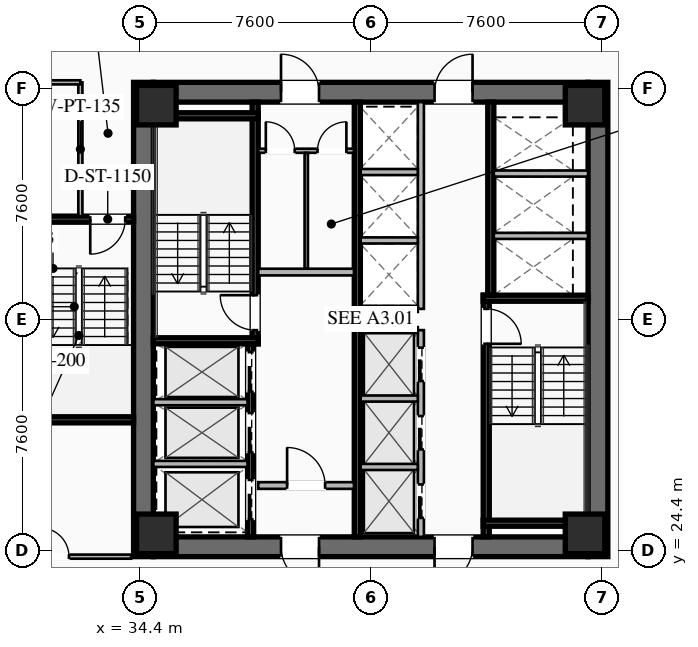
"""IFC4 building model, lengths in metres.
Left out: names, types, materials, properties, quantities, classifications, styles, units other than length and angle.
Written with IfcOpenShell. Run it as: python <this file> out.ifc"""

import sys

from ifc_helpers import new_model, si_unit, direction, frame, frame_2d, origin, origin_2d, place, context, subcontext, project, spatial, rectangle, hollow_rectangle, extrude, element, fill, save


model = new_model("IFC4")
c1 = context("Model", 3, precision=1e-05, world=origin(), true_north=direction((0.0, 1.0)))
c2 = subcontext(c1, "Body", "Model", "MODEL_VIEW")
j1 = project(units=[si_unit("LENGTHUNIT", "METRE"), si_unit("PLANEANGLEUNIT", "RADIAN")], contexts=[c1])
p1 = place(None, origin())
s1 = spatial("IfcSite", under=j1, at=p1, CompositionType="ELEMENT")
p2 = place(p1, origin())
s2 = spatial("IfcBuilding", under=s1, at=p2, CompositionType="ELEMENT")
p3 = place(p2, frame((0.0, 0.0, 81.4)))
s3 = spatial("IfcBuildingStorey", under=s2, at=p3, CompositionType="ELEMENT", Elevation=81.4)
for number, where, z_axis, x_axis in (
    (1, (34.525, 24.2, 0.0), (0.0, 0.0, 1.0), (0.0, 1.0, 0.0)),
    (2, (49.475, 39.8, 0.0), (0.0, 0.0, 1.0), (0.0, -1.0, 0.0)),
):
    element("IfcWall", number, at=place(p3, frame(where, z_axis=z_axis, x_axis=x_axis)), inside=s3, PredefinedType="SHEAR", context=c2, shape_type="SweptSolid", body=[
        extrude(rectangle(XDim=15.6, YDim=0.65, at=frame_2d((7.8, 0.0))), origin(), (0.0, 0.0, 1.0), 3.55),
    ])
p4 = place(p3, frame((49.15, 24.525, 0.0), z_axis=(0.0, 0.0, 1.0), x_axis=(-1.0, 0.0, 0.0)))
e3 = element("IfcWall", 3, at=p4, inside=s3, PredefinedType="SHEAR", context=c2, shape_type="SweptSolid", body=[
    extrude(rectangle(XDim=14.3, YDim=0.65, at=frame_2d((7.15, 0.0))), origin(), (0.0, 0.0, 1.0), 3.55),
])
p5 = place(p4, frame((8.85, 0.0, 0.0)))
e4 = element("IfcOpeningElement", 4, at=p5, cuts=e3, PredefinedType="OPENING", context=c2, shape_type="SweptSolid", body=[
    extrude(rectangle(XDim=1.25, YDim=2.25, at=frame_2d((0.625, 1.125))), frame((0.0, 0.335, 0.0), z_axis=(0.0, -1.0, 0.0), x_axis=(1.0, 0.0, 0.0)), (0.0, 0.0, 1.0), 0.67),
])
p6 = place(p4, frame((3.8, 0.0, 0.0)))
e5 = element("IfcOpeningElement", 5, at=p6, cuts=e3, PredefinedType="OPENING", context=c2, shape_type="SweptSolid", body=[
    extrude(rectangle(XDim=1.25, YDim=2.25, at=frame_2d((0.625, 1.125))), frame((0.0, 0.335, 0.0), z_axis=(0.0, -1.0, 0.0), x_axis=(1.0, 0.0, 0.0)), (0.0, 0.0, 1.0), 0.67),
])
p7 = place(p3, frame((34.85, 39.475, 0.0), z_axis=(0.0, 0.0, 1.0), x_axis=(1.0, 0.0, 0.0)))
e6 = element("IfcWall", 6, at=p7, inside=s3, PredefinedType="SHEAR", context=c2, shape_type="SweptSolid", body=[
    extrude(rectangle(XDim=14.3, YDim=0.65, at=frame_2d((7.15, 0.0))), origin(), (0.0, 0.0, 1.0), 3.55),
])
p8 = place(p7, frame((4.2, 0.0, 0.0)))
e7 = element("IfcOpeningElement", 7, at=p8, cuts=e6, PredefinedType="OPENING", context=c2, shape_type="SweptSolid", body=[
    extrude(rectangle(XDim=1.25, YDim=2.25, at=frame_2d((0.625, 1.125))), frame((0.0, 0.335, 0.0), z_axis=(0.0, -1.0, 0.0), x_axis=(1.0, 0.0, 0.0)), (0.0, 0.0, 1.0), 0.67),
])
p9 = place(p7, frame((9.25, 0.0, 0.0)))
e8 = element("IfcOpeningElement", 8, at=p9, cuts=e6, PredefinedType="OPENING", context=c2, shape_type="SweptSolid", body=[
    extrude(rectangle(XDim=1.25, YDim=2.25, at=frame_2d((0.625, 1.125))), frame((0.0, 0.335, 0.0), z_axis=(0.0, -1.0, 0.0), x_axis=(1.0, 0.0, 0.0)), (0.0, 0.0, 1.0), 0.67),
])
for number, where, z_axis, x_axis in (
    (9, (34.95, 24.95, 0.0), (0.0, 0.0, 1.0), (1.0, 0.0, 0.0)),
    (10, (49.05, 24.95, 0.0), (0.0, 0.0, 1.0), (1.0, 0.0, 0.0)),
    (11, (49.05, 39.05, 0.0), (0.0, 0.0, 1.0), (1.0, 0.0, 0.0)),
    (12, (34.95, 39.05, 0.0), (0.0, 0.0, 1.0), (1.0, 0.0, 0.0)),
):
    element("IfcColumn", number, at=place(p3, frame(where, z_axis=z_axis, x_axis=x_axis)), inside=s3, PredefinedType="COLUMN", context=c2, shape_type="SweptSolid", body=[
        extrude(hollow_rectangle(XDim=1.3, YDim=1.3, WallThickness=0.05, at=origin_2d()), origin(), (0.0, 0.0, 1.0), 3.35),
    ])
p10 = place(p3, frame((38.2, 31.2, 0.0), z_axis=(0.0, 0.0, 1.0), x_axis=(0.0, 1.0, 0.0)))
e13 = element("IfcWall", 13, at=p10, inside=s3, PredefinedType="SHEAR", context=c2, shape_type="SweptSolid", body=[
    extrude(rectangle(XDim=7.95, YDim=0.2, at=frame_2d((3.975, 0.0))), origin(), (0.0, 0.0, 1.0), 3.35),
])
p11 = place(p10, frame((0.45, 0.0, 0.0)))
e14 = element("IfcOpeningElement", 14, at=p11, cuts=e13, PredefinedType="OPENING", context=c2, shape_type="SweptSolid", body=[
    extrude(rectangle(XDim=1.15, YDim=2.2, at=frame_2d((0.575, 1.1))), frame((0.0, 0.11, 0.0), z_axis=(0.0, -1.0, 0.0), x_axis=(1.0, 0.0, 0.0)), (0.0, 0.0, 1.0), 0.22),
])
for number, where, z_axis, x_axis in (
    (15, (34.85, 31.3, 0.0), (0.0, 0.0, 1.0), (1.0, 0.0, 0.0)),
    (16, (34.85, 38.7, 0.0), (0.0, 0.0, 1.0), (1.0, 0.0, 0.0)),
):
    element("IfcWall", number, at=place(p3, frame(where, z_axis=z_axis, x_axis=x_axis)), inside=s3, PredefinedType="SHEAR", context=c2, shape_type="SweptSolid", body=[
        extrude(rectangle(XDim=3.45, YDim=0.2, at=frame_2d((1.725, 0.0))), origin(), (0.0, 0.0, 1.0), 3.35),
    ])
p12 = place(p3, frame((45.8, 32.8, 0.0), z_axis=(0.0, 0.0, 1.0), x_axis=(0.0, -1.0, 0.0)))
e17 = element("IfcWall", 17, at=p12, inside=s3, PredefinedType="SHEAR", context=c2, shape_type="SweptSolid", body=[
    extrude(rectangle(XDim=7.95, YDim=0.2, at=frame_2d((3.975, 0.0))), origin(), (0.0, 0.0, 1.0), 3.35),
])
p13 = place(p12, frame((0.45, 0.0, 0.0)))
e18 = element("IfcOpeningElement", 18, at=p13, cuts=e17, PredefinedType="OPENING", context=c2, shape_type="SweptSolid", body=[
    extrude(rectangle(XDim=1.15, YDim=2.2, at=frame_2d((0.575, 1.1))), frame((0.0, 0.11, 0.0), z_axis=(0.0, -1.0, 0.0), x_axis=(1.0, 0.0, 0.0)), (0.0, 0.0, 1.0), 0.22),
])
for number, where, z_axis, x_axis in (
    (19, (45.7, 32.7, 0.0), (0.0, 0.0, 1.0), (1.0, 0.0, 0.0)),
    (20, (45.7, 25.3, 0.0), (0.0, 0.0, 1.0), (1.0, 0.0, 0.0)),
):
    element("IfcWall", number, at=place(p3, frame(where, z_axis=z_axis, x_axis=x_axis)), inside=s3, PredefinedType="SHEAR", context=c2, shape_type="SweptSolid", body=[
        extrude(rectangle(XDim=3.45, YDim=0.2, at=frame_2d((1.725, 0.0))), origin(), (0.0, 0.0, 1.0), 3.35),
    ])
p14 = place(p3, frame((41.56, 24.85, 0.0), z_axis=(0.0, 0.0, 1.0), x_axis=(0.0, 1.0, 0.0)))
e21 = element("IfcWall", 21, at=p14, inside=s3, PredefinedType="SHEAR", context=c2, shape_type="SweptSolid", body=[
    extrude(rectangle(XDim=14.3, YDim=0.2, at=frame_2d((7.15, 0.0))), origin(), (0.0, 0.0, 1.0), 3.35),
])
p15 = place(p3, frame((38.3, 33.56, 0.0), z_axis=(0.0, 0.0, 1.0), x_axis=(1.0, 0.0, 0.0)))
e22 = element("IfcWall", 22, at=p15, inside=s3, PredefinedType="SOLIDWALL", context=c2, shape_type="SweptSolid", body=[
    extrude(rectangle(XDim=3.15, YDim=0.22, at=frame_2d((1.575, 0.0))), origin(), (0.0, 0.0, 1.0), 2.703),
])
p16 = place(p3, frame((38.3, 26.54, 0.0), z_axis=(0.0, 0.0, 1.0), x_axis=(1.0, 0.0, 0.0)))
e23 = element("IfcWall", 23, at=p16, inside=s3, PredefinedType="SOLIDWALL", context=c2, shape_type="SweptSolid", body=[
    extrude(rectangle(XDim=3.15, YDim=0.22, at=frame_2d((1.575, 0.0))), origin(), (0.0, 0.0, 1.0), 2.703),
])
p17 = place(p16, frame((0.95, 0.0, 0.0)))
e24 = element("IfcOpeningElement", 24, at=p17, cuts=e23, PredefinedType="OPENING", context=c2, shape_type="SweptSolid", body=[
    extrude(rectangle(XDim=1.25, YDim=2.25, at=frame_2d((0.625, 1.125))), frame((0.0, 0.12, 0.0), z_axis=(0.0, -1.0, 0.0), x_axis=(1.0, 0.0, 0.0)), (0.0, 0.0, 1.0), 0.24),
])
p18 = place(p3, frame((38.05, 24.85, 0.0), z_axis=(0.0, 0.0, 1.0), x_axis=(0.0, 1.0, 0.0)))
e25 = element("IfcWall", 25, at=p18, inside=s3, PredefinedType="SHEAR", context=c2, shape_type="SweptSolid", body=[
    extrude(rectangle(XDim=6.35, YDim=0.2, at=frame_2d((3.175, 0.0))), origin(), (0.0, 0.0, 1.0), 3.35),
])
p19 = place(p18, frame((4.775, 0.0, 0.0)))
e26 = element("IfcOpeningElement", 26, at=p19, cuts=e25, PredefinedType="OPENING", context=c2, shape_type="SweptSolid", body=[
    extrude(rectangle(XDim=1.3, YDim=2.25, at=frame_2d((0.65, 1.125))), frame((0.0, 0.11, 0.0), z_axis=(0.0, -1.0, 0.0), x_axis=(1.0, 0.0, 0.0)), (0.0, 0.0, 1.0), 0.22),
])
p20 = place(p18, frame((2.775, 0.0, 0.0)))
e27 = element("IfcOpeningElement", 27, at=p20, cuts=e25, PredefinedType="OPENING", context=c2, shape_type="SweptSolid", body=[
    extrude(rectangle(XDim=1.3, YDim=2.25, at=frame_2d((0.65, 1.125))), frame((0.0, 0.11, 0.0), z_axis=(0.0, -1.0, 0.0), x_axis=(1.0, 0.0, 0.0)), (0.0, 0.0, 1.0), 0.22),
])
p21 = place(p18, frame((0.575, 0.0, 0.0)))
e28 = element("IfcOpeningElement", 28, at=p21, cuts=e25, PredefinedType="OPENING", context=c2, shape_type="SweptSolid", body=[
    extrude(rectangle(XDim=1.3, YDim=2.25, at=frame_2d((0.65, 1.125))), frame((0.0, 0.11, 0.0), z_axis=(0.0, -1.0, 0.0), x_axis=(1.0, 0.0, 0.0)), (0.0, 0.0, 1.0), 0.22),
])
for number, where, z_axis, x_axis in (
    (29, (34.85, 27.25, 0.0), (0.0, 0.0, 1.0), (1.0, 0.0, 0.0)),
    (30, (34.85, 29.28, 0.0), (0.0, 0.0, 1.0), (1.0, 0.0, 0.0)),
):
    element("IfcWall", number, at=place(p3, frame(where, z_axis=z_axis, x_axis=x_axis)), inside=s3, PredefinedType="SOLIDWALL", context=c2, shape_type="SweptSolid", body=[
        extrude(rectangle(XDim=3.1, YDim=0.2, at=frame_2d((1.55, 0.0))), origin(), (0.0, 0.0, 1.0), 3.35),
    ])
p22 = place(p3, frame((45.95, 39.15, 0.0), z_axis=(0.0, 0.0, 1.0), x_axis=(0.0, -1.0, 0.0)))
e31 = element("IfcWall", 31, at=p22, inside=s3, PredefinedType="SHEAR", context=c2, shape_type="SweptSolid", body=[
    extrude(rectangle(XDim=6.35, YDim=0.2, at=frame_2d((3.175, 0.0))), origin(), (0.0, 0.0, 1.0), 3.35),
])
for number, where, z_axis, x_axis in (
    (32, (46.05, 34.75, 0.0), (0.0, 0.0, 1.0), (1.0, 0.0, 0.0)),
    (33, (46.05, 36.8, 0.0), (0.0, 0.0, 1.0), (1.0, 0.0, 0.0)),
):
    element("IfcWall", number, at=place(p3, frame(where, z_axis=z_axis, x_axis=x_axis)), inside=s3, PredefinedType="SOLIDWALL", context=c2, shape_type="SweptSolid", body=[
        extrude(rectangle(XDim=3.1, YDim=0.2, at=frame_2d((1.55, 0.0))), origin(), (0.0, 0.0, 1.0), 3.35),
    ])
p23 = place(p3, frame((38.3, 37.55, 0.0), z_axis=(0.0, 0.0, 1.0), x_axis=(1.0, 0.0, 0.0)))
e34 = element("IfcWall", 34, at=p23, inside=s3, PredefinedType="PARTITIONING", context=c2, shape_type="SweptSolid", body=[
    extrude(rectangle(XDim=3.15, YDim=0.135, at=frame_2d((1.575, 0.0))), origin(), (0.0, 0.0, 1.0), 2.703),
])
p24 = place(p23, frame((0.25, 0.0, 0.0)))
e35 = element("IfcOpeningElement", 35, at=p24, cuts=e34, PredefinedType="OPENING", context=c2, shape_type="SweptSolid", body=[
    extrude(rectangle(XDim=0.95, YDim=2.05, at=frame_2d((0.475, 1.025))), frame((0.0, 0.077, 0.0), z_axis=(0.0, -1.0, 0.0), x_axis=(1.0, 0.0, 0.0)), (0.0, 0.0, 1.0), 0.155),
])
p25 = place(p23, frame((1.95, 0.0, 0.0)))
e36 = element("IfcOpeningElement", 36, at=p25, cuts=e34, PredefinedType="OPENING", context=c2, shape_type="SweptSolid", body=[
    extrude(rectangle(XDim=0.95, YDim=2.05, at=frame_2d((0.475, 1.025))), frame((0.0, 0.077, 0.0), z_axis=(0.0, -1.0, 0.0), x_axis=(1.0, 0.0, 0.0)), (0.0, 0.0, 1.0), 0.155),
])
p26 = place(p3, frame((39.88, 33.68, 0.0), z_axis=(0.0, 0.0, 1.0), x_axis=(0.0, 1.0, 0.0)))
e37 = element("IfcWall", 37, at=p26, inside=s3, PredefinedType="PARTITIONING", context=c2, shape_type="SweptSolid", body=[
    extrude(rectangle(XDim=3.8, YDim=0.11, at=frame_2d((1.9, 0.0))), origin(), (0.0, 0.0, 1.0), 2.703),
])
p27 = place(p3, frame((43.65, 24.85, 0.0), z_axis=(0.0, 0.0, 1.0), x_axis=(0.0, 1.0, 0.0)))
e38 = element("IfcWall", 38, at=p27, inside=s3, PredefinedType="SOLIDWALL", context=c2, shape_type="SweptSolid", body=[
    extrude(rectangle(XDim=6.8, YDim=0.2, at=frame_2d((3.4, 0.0))), origin(), (0.0, 0.0, 1.0), 3.35),
])
p28 = place(p27, frame((0.625, 0.0, 0.0)))
e39 = element("IfcOpeningElement", 39, at=p28, cuts=e38, PredefinedType="OPENING", context=c2, shape_type="SweptSolid", body=[
    extrude(rectangle(XDim=1.1, YDim=2.2, at=frame_2d((0.55, 1.1))), frame((0.0, 0.11, 0.0), z_axis=(0.0, -1.0, 0.0), x_axis=(1.0, 0.0, 0.0)), (0.0, 0.0, 1.0), 0.22),
])
p29 = place(p27, frame((2.875, 0.0, 0.0)))
e40 = element("IfcOpeningElement", 40, at=p29, cuts=e38, PredefinedType="OPENING", context=c2, shape_type="SweptSolid", body=[
    extrude(rectangle(XDim=1.1, YDim=2.2, at=frame_2d((0.55, 1.1))), frame((0.0, 0.11, 0.0), z_axis=(0.0, -1.0, 0.0), x_axis=(1.0, 0.0, 0.0)), (0.0, 0.0, 1.0), 0.22),
])
p30 = place(p27, frame((5.125, 0.0, 0.0)))
e41 = element("IfcOpeningElement", 41, at=p30, cuts=e38, PredefinedType="OPENING", context=c2, shape_type="SweptSolid", body=[
    extrude(rectangle(XDim=1.1, YDim=2.2, at=frame_2d((0.55, 1.1))), frame((0.0, 0.11, 0.0), z_axis=(0.0, -1.0, 0.0), x_axis=(1.0, 0.0, 0.0)), (0.0, 0.0, 1.0), 0.22),
])
for number, where, z_axis, x_axis in (
    (42, (41.67, 27.15, 0.0), (0.0, 0.0, 1.0), (1.0, 0.0, 0.0)),
    (43, (41.67, 29.4, 0.0), (0.0, 0.0, 1.0), (1.0, 0.0, 0.0)),
    (44, (41.67, 31.65, 0.0), (0.0, 0.0, 1.0), (1.0, 0.0, 0.0)),
):
    element("IfcWall", number, at=place(p3, frame(where, z_axis=z_axis, x_axis=x_axis)), inside=s3, PredefinedType="SOLIDWALL", context=c2, shape_type="SweptSolid", body=[
        extrude(rectangle(XDim=1.88, YDim=0.2, at=frame_2d((0.94, 0.0))), origin(), (0.0, 0.0, 1.0), 3.35),
    ])
p31 = place(p3, frame((43.65, 32.35, 0.0), z_axis=(0.0, 0.0, 1.0), x_axis=(0.0, 1.0, 0.0)))
e45 = element("IfcWall", 45, at=p31, inside=s3, PredefinedType="SOLIDWALL", context=c2, shape_type="SweptSolid", body=[
    extrude(rectangle(XDim=6.8, YDim=0.2, at=frame_2d((3.4, 0.0))), origin(), (0.0, 0.0, 1.0), 3.35),
])
for number, where, z_axis, x_axis in (
    (46, (41.67, 32.35, 0.0), (0.0, 0.0, 1.0), (1.0, 0.0, 0.0)),
    (47, (41.67, 34.6, 0.0), (0.0, 0.0, 1.0), (1.0, 0.0, 0.0)),
    (48, (41.67, 36.85, 0.0), (0.0, 0.0, 1.0), (1.0, 0.0, 0.0)),
):
    element("IfcWall", number, at=place(p3, frame(where, z_axis=z_axis, x_axis=x_axis)), inside=s3, PredefinedType="SOLIDWALL", context=c2, shape_type="SweptSolid", body=[
        extrude(rectangle(XDim=1.88, YDim=0.2, at=frame_2d((0.94, 0.0))), origin(), (0.0, 0.0, 1.0), 3.35),
    ])
p32 = place(p3, frame((34.2, 35.3, 0.0), z_axis=(0.0, 0.0, 1.0), x_axis=(-1.0, 0.0, 0.0)))
e49 = element("IfcWall", 49, at=p32, inside=s3, PredefinedType="SHEAR", context=c2, shape_type="SweptSolid", body=[
    extrude(rectangle(XDim=3.4, YDim=0.2, at=frame_2d((1.7, 0.0))), origin(), (0.0, 0.0, 1.0), 3.35),
])
p33 = place(p32, frame((0.275, 0.0, 0.0)))
e50 = element("IfcOpeningElement", 50, at=p33, cuts=e49, PredefinedType="OPENING", context=c2, shape_type="SweptSolid", body=[
    extrude(rectangle(XDim=1.15, YDim=2.2, at=frame_2d((0.575, 1.1))), frame((0.0, 0.11, 0.0), z_axis=(0.0, -1.0, 0.0), x_axis=(1.0, 0.0, 0.0)), (0.0, 0.0, 1.0), 0.22),
])
p34 = place(p3, frame((30.8, 28.7, 0.0), z_axis=(0.0, 0.0, 1.0), x_axis=(1.0, 0.0, 0.0)))
e51 = element("IfcWall", 51, at=p34, inside=s3, PredefinedType="SHEAR", context=c2, shape_type="SweptSolid", body=[
    extrude(rectangle(XDim=3.4, YDim=0.2, at=frame_2d((1.7, 0.0))), origin(), (0.0, 0.0, 1.0), 3.35),
])
p35 = place(p3, frame((32.45, 35.4, 0.0), z_axis=(0.0, 0.0, 1.0), x_axis=(0.0, 1.0, 0.0)))
e52 = element("IfcWall", 52, at=p35, inside=s3, PredefinedType="PARTITIONING", context=c2, shape_type="SweptSolid", body=[
    extrude(rectangle(XDim=4.4, YDim=0.135, at=frame_2d((2.2, 0.0))), origin(), (0.0, 0.0, 1.0), 2.703),
])
p36 = place(p3, frame((32.45, 39.8, 0.0), z_axis=(0.0, 0.0, 1.0), x_axis=(-1.0, 0.0, 0.0)))
e53 = element("IfcWall", 53, at=p36, inside=s3, PredefinedType="PARTITIONING", context=c2, shape_type="SweptSolid", body=[
    extrude(rectangle(XDim=11.43, YDim=0.135, at=frame_2d((5.715, 0.0))), origin(), (0.0, 0.0, 1.0), 2.703),
])
p37 = place(p36, frame((4.89, 0.0, 0.0)))
e54 = element("IfcOpeningElement", 54, at=p37, cuts=e53, PredefinedType="OPENING", context=c2, shape_type="SweptSolid", body=[
    extrude(rectangle(XDim=0.95, YDim=2.05, at=frame_2d((0.475, 1.025))), frame((0.0, 0.077, 0.0), z_axis=(0.0, -1.0, 0.0), x_axis=(1.0, 0.0, 0.0)), (0.0, 0.0, 1.0), 0.155),
])
p38 = place(p3, frame((21.02, 24.2, 0.0), z_axis=(0.0, 0.0, 1.0), x_axis=(1.0, 0.0, 0.0)))
e55 = element("IfcWall", 55, at=p38, inside=s3, PredefinedType="PARTITIONING", context=c2, shape_type="SweptSolid", body=[
    extrude(rectangle(XDim=13.1, YDim=0.135, at=frame_2d((6.55, 0.0))), origin(), (0.0, 0.0, 1.0), 2.703),
])
p39 = place(p38, frame((10.105, 0.0, 0.0)))
e56 = element("IfcOpeningElement", 56, at=p39, cuts=e55, PredefinedType="OPENING", context=c2, shape_type="SweptSolid", body=[
    extrude(rectangle(XDim=0.95, YDim=2.05, at=frame_2d((0.475, 1.025))), frame((0.0, 0.077, 0.0), z_axis=(0.0, -1.0, 0.0), x_axis=(1.0, 0.0, 0.0)), (0.0, 0.0, 1.0), 0.155),
])
p40 = place(p8, origin())
e57 = element("IfcDoor", 57, at=p40, inside=s3, OperationType="SINGLE_SWING_LEFT", PredefinedType="DOOR", context=c2, shape_type="SweptSolid", body=[
    extrude(rectangle(XDim=1.25, YDim=2.25, at=frame_2d((0.625, 1.125))), frame((0.0, 0.025, 0.0), z_axis=(0.0, -1.0, 0.0), x_axis=(1.0, 0.0, 0.0)), (0.0, 0.0, 1.0), 0.05),
])
fill(e7, e57)
p41 = place(p9, origin())
e58 = element("IfcDoor", 58, at=p41, inside=s3, OperationType="SINGLE_SWING_RIGHT", PredefinedType="DOOR", context=c2, shape_type="SweptSolid", body=[
    extrude(rectangle(XDim=1.25, YDim=2.25, at=frame_2d((0.625, 1.125))), frame((0.0, 0.025, 0.0), z_axis=(0.0, -1.0, 0.0), x_axis=(1.0, 0.0, 0.0)), (0.0, 0.0, 1.0), 0.05),
])
fill(e8, e58)
p42 = place(p5, origin())
e59 = element("IfcDoor", 59, at=p42, inside=s3, OperationType="SINGLE_SWING_LEFT", PredefinedType="DOOR", context=c2, shape_type="SweptSolid", body=[
    extrude(rectangle(XDim=1.25, YDim=2.25, at=frame_2d((0.625, 1.125))), frame((0.0, 0.025, 0.0), z_axis=(0.0, -1.0, 0.0), x_axis=(1.0, 0.0, 0.0)), (0.0, 0.0, 1.0), 0.05),
])
fill(e4, e59)
p43 = place(p6, origin())
e60 = element("IfcDoor", 60, at=p43, inside=s3, OperationType="SINGLE_SWING_RIGHT", PredefinedType="DOOR", context=c2, shape_type="SweptSolid", body=[
    extrude(rectangle(XDim=1.25, YDim=2.25, at=frame_2d((0.625, 1.125))), frame((0.0, 0.025, 0.0), z_axis=(0.0, -1.0, 0.0), x_axis=(1.0, 0.0, 0.0)), (0.0, 0.0, 1.0), 0.05),
])
fill(e5, e60)
p44 = place(p11, origin())
e61 = element("IfcDoor", 61, at=p44, inside=s3, OperationType="SINGLE_SWING_RIGHT", PredefinedType="DOOR", context=c2, shape_type="SweptSolid", body=[
    extrude(rectangle(XDim=1.15, YDim=2.2, at=frame_2d((0.575, 1.1))), frame((0.0, 0.025, 0.0), z_axis=(0.0, -1.0, 0.0), x_axis=(1.0, 0.0, 0.0)), (0.0, 0.0, 1.0), 0.05),
])
fill(e14, e61)
p45 = place(p13, origin())
e62 = element("IfcDoor", 62, at=p45, inside=s3, OperationType="SINGLE_SWING_RIGHT", PredefinedType="DOOR", context=c2, shape_type="SweptSolid", body=[
    extrude(rectangle(XDim=1.15, YDim=2.2, at=frame_2d((0.575, 1.1))), frame((0.0, 0.025, 0.0), z_axis=(0.0, -1.0, 0.0), x_axis=(1.0, 0.0, 0.0)), (0.0, 0.0, 1.0), 0.05),
])
fill(e18, e62)
p46 = place(p17, origin())
e63 = element("IfcDoor", 63, at=p46, inside=s3, OperationType="SINGLE_SWING_LEFT", PredefinedType="DOOR", context=c2, shape_type="SweptSolid", body=[
    extrude(rectangle(XDim=1.25, YDim=2.25, at=frame_2d((0.625, 1.125))), frame((0.0, 0.025, 0.0), z_axis=(0.0, -1.0, 0.0), x_axis=(1.0, 0.0, 0.0)), (0.0, 0.0, 1.0), 0.05),
])
fill(e24, e63)
p47 = place(p24, origin())
e64 = element("IfcDoor", 64, at=p47, inside=s3, OperationType="SINGLE_SWING_LEFT", PredefinedType="DOOR", context=c2, shape_type="SweptSolid", body=[
    extrude(rectangle(XDim=0.95, YDim=2.05, at=frame_2d((0.475, 1.025))), frame((0.0, 0.025, 0.0), z_axis=(0.0, -1.0, 0.0), x_axis=(1.0, 0.0, 0.0)), (0.0, 0.0, 1.0), 0.05),
])
fill(e35, e64)
p48 = place(p25, origin())
e65 = element("IfcDoor", 65, at=p48, inside=s3, OperationType="SINGLE_SWING_RIGHT", PredefinedType="DOOR", context=c2, shape_type="SweptSolid", body=[
    extrude(rectangle(XDim=0.95, YDim=2.05, at=frame_2d((0.475, 1.025))), frame((0.0, 0.025, 0.0), z_axis=(0.0, -1.0, 0.0), x_axis=(1.0, 0.0, 0.0)), (0.0, 0.0, 1.0), 0.05),
])
fill(e36, e65)
p49 = place(p33, origin())
e66 = element("IfcDoor", 66, at=p49, inside=s3, OperationType="SINGLE_SWING_RIGHT", PredefinedType="DOOR", context=c2, shape_type="SweptSolid", body=[
    extrude(rectangle(XDim=1.15, YDim=2.2, at=frame_2d((0.575, 1.1))), frame((0.0, 0.025, 0.0), z_axis=(0.0, -1.0, 0.0), x_axis=(1.0, 0.0, 0.0)), (0.0, 0.0, 1.0), 0.05),
])
fill(e50, e66)
p50 = place(p39, origin())
e67 = element("IfcDoor", 67, at=p50, inside=s3, OperationType="SINGLE_SWING_LEFT", PredefinedType="DOOR", context=c2, shape_type="SweptSolid", body=[
    extrude(rectangle(XDim=0.95, YDim=2.05, at=frame_2d((0.475, 1.025))), frame((0.0, 0.025, 0.0), z_axis=(0.0, -1.0, 0.0), x_axis=(1.0, 0.0, 0.0)), (0.0, 0.0, 1.0), 0.05),
])
fill(e56, e67)
p51 = place(p19, origin())
e68 = element("IfcDoor", 68, at=p51, inside=s3, OperationType="SLIDING_TO_LEFT", PredefinedType="DOOR", context=c2, shape_type="SweptSolid", body=[
    extrude(rectangle(XDim=1.3, YDim=2.25, at=frame_2d((0.65, 1.125))), frame((0.0, 0.025, 0.0), z_axis=(0.0, -1.0, 0.0), x_axis=(1.0, 0.0, 0.0)), (0.0, 0.0, 1.0), 0.05),
])
fill(e26, e68)
p52 = place(p20, origin())
e69 = element("IfcDoor", 69, at=p52, inside=s3, OperationType="SLIDING_TO_LEFT", PredefinedType="DOOR", context=c2, shape_type="SweptSolid", body=[
    extrude(rectangle(XDim=1.3, YDim=2.25, at=frame_2d((0.65, 1.125))), frame((0.0, 0.025, 0.0), z_axis=(0.0, -1.0, 0.0), x_axis=(1.0, 0.0, 0.0)), (0.0, 0.0, 1.0), 0.05),
])
fill(e27, e69)
p53 = place(p21, origin())
e70 = element("IfcDoor", 70, at=p53, inside=s3, OperationType="SLIDING_TO_LEFT", PredefinedType="DOOR", context=c2, shape_type="SweptSolid", body=[
    extrude(rectangle(XDim=1.3, YDim=2.25, at=frame_2d((0.65, 1.125))), frame((0.0, 0.025, 0.0), z_axis=(0.0, -1.0, 0.0), x_axis=(1.0, 0.0, 0.0)), (0.0, 0.0, 1.0), 0.05),
])
fill(e28, e70)
p54 = place(p28, origin())
e71 = element("IfcDoor", 71, at=p54, inside=s3, OperationType="SLIDING_TO_LEFT", PredefinedType="DOOR", context=c2, shape_type="SweptSolid", body=[
    extrude(rectangle(XDim=1.1, YDim=2.2, at=frame_2d((0.55, 1.1))), frame((0.0, 0.025, 0.0), z_axis=(0.0, -1.0, 0.0), x_axis=(1.0, 0.0, 0.0)), (0.0, 0.0, 1.0), 0.05),
])
fill(e39, e71)
p55 = place(p29, origin())
e72 = element("IfcDoor", 72, at=p55, inside=s3, OperationType="SLIDING_TO_LEFT", PredefinedType="DOOR", context=c2, shape_type="SweptSolid", body=[
    extrude(rectangle(XDim=1.1, YDim=2.2, at=frame_2d((0.55, 1.1))), frame((0.0, 0.025, 0.0), z_axis=(0.0, -1.0, 0.0), x_axis=(1.0, 0.0, 0.0)), (0.0, 0.0, 1.0), 0.05),
])
fill(e40, e72)
p56 = place(p30, origin())
e73 = element("IfcDoor", 73, at=p56, inside=s3, OperationType="SLIDING_TO_LEFT", PredefinedType="DOOR", context=c2, shape_type="SweptSolid", body=[
    extrude(rectangle(XDim=1.1, YDim=2.2, at=frame_2d((0.55, 1.1))), frame((0.0, 0.025, 0.0), z_axis=(0.0, -1.0, 0.0), x_axis=(1.0, 0.0, 0.0)), (0.0, 0.0, 1.0), 0.05),
])
fill(e41, e73)
save(model, sys.argv[1])
